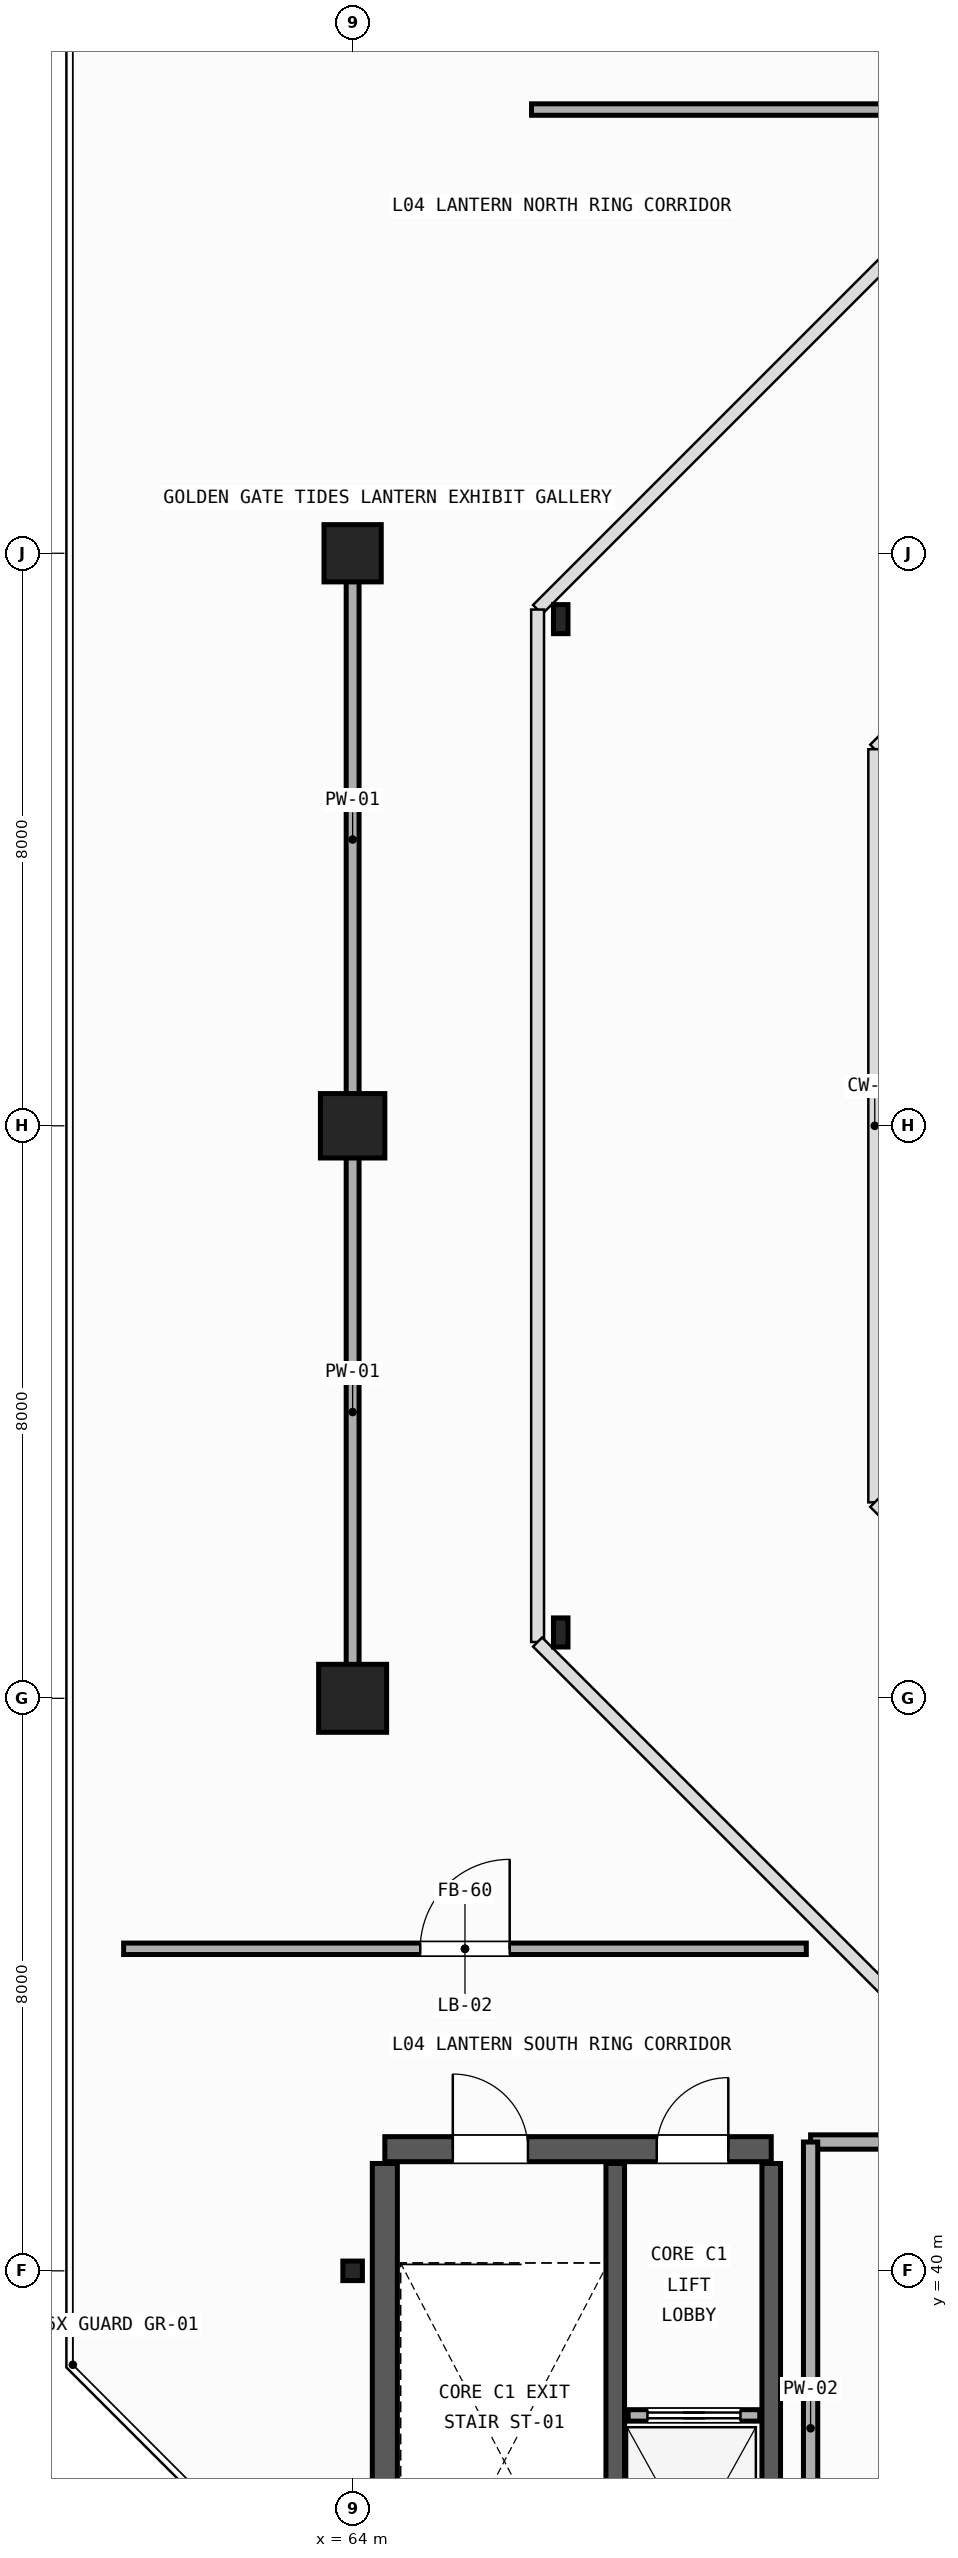
"""IFC4 building model, lengths in metres.
Left out: names, types, materials, properties, quantities, classifications, styles, units other than length and angle.
Written with IfcOpenShell. Run it as: python <this file> out.ifc"""

import sys

from ifc_helpers import new_model, si_unit, direction, frame, frame_2d, origin, origin_2d, place, context, subcontext, project, spatial, rectangle, hollow_rectangle, hollow_circle, extrude, element, fill, save


model = new_model("IFC4")
c1 = context("Model", 3, precision=1e-05, world=origin(), true_north=direction((0.0, 1.0)))
c2 = subcontext(c1, "Body", "Model", "MODEL_VIEW")
j1 = project(units=[si_unit("LENGTHUNIT", "METRE"), si_unit("PLANEANGLEUNIT", "RADIAN")], contexts=[c1])
p1 = place(None, origin())
s1 = spatial("IfcSite", under=j1, at=p1, CompositionType="ELEMENT")
p2 = place(p1, origin())
s2 = spatial("IfcBuilding", under=s1, at=p2, CompositionType="ELEMENT")
p3 = place(p2, frame((0.0, 0.0, 19.8)))
s3 = spatial("IfcBuildingStorey", under=s2, at=p3, CompositionType="ELEMENT", Elevation=19.8)
p4 = place(p3, frame((64.0, 40.0, 0.0), z_axis=(0.0, 0.0, 1.0), x_axis=(1.0, 0.0, 0.0)))
e1 = element("IfcColumn", 1, at=p4, inside=s3, PredefinedType="COLUMN", context=c2, shape_type="SweptSolid", body=[
    extrude(hollow_circle(Radius=0.136, WallThickness=0.012, at=origin_2d()), origin(), (0.0, 0.0, 1.0), 5.637),
])
p5 = place(p3, frame((64.0, 48.0, 0.0), z_axis=(0.0, 0.0, 1.0), x_axis=(0.0, 1.0, 0.0)))
e2 = element("IfcColumn", 2, at=p5, inside=s3, PredefinedType="COLUMN", context=c2, shape_type="SweptSolid", body=[
    extrude(rectangle(XDim=0.95, YDim=0.95, at=origin_2d()), origin(), (0.0, 0.0, 1.0), 5.245),
])
p6 = place(p3, frame((64.0, 56.0, 0.0), z_axis=(0.0, 0.0, 1.0), x_axis=(1.0, 0.0, 0.0)))
e3 = element("IfcColumn", 3, at=p6, inside=s3, PredefinedType="COLUMN", context=c2, shape_type="SweptSolid", body=[
    extrude(rectangle(XDim=0.9, YDim=0.9, at=origin_2d()), origin(), (0.0, 0.0, 1.0), 5.245),
])
p7 = place(p3, frame((64.0, 64.0, 0.0), z_axis=(0.0, 0.0, 1.0), x_axis=(0.0, 1.0, 0.0)))
e4 = element("IfcColumn", 4, at=p7, inside=s3, PredefinedType="COLUMN", context=c2, shape_type="SweptSolid", body=[
    extrude(rectangle(XDim=0.8, YDim=0.8, at=origin_2d()), origin(), (0.0, 0.0, 1.0), 5.245),
])
for number, where, z_axis, x_axis in (
    (5, (66.908, 63.08, 0.0), (0.0, 0.0, 1.0), (1.0, 0.0, 0.0)),
    (6, (66.908, 48.92, 0.0), (0.0, 0.0, 1.0), (1.0, 0.0, 0.0)),
):
    element("IfcColumn", number, at=place(p3, frame(where, z_axis=z_axis, x_axis=x_axis)), inside=s3, PredefinedType="COLUMN", context=c2, shape_type="SweptSolid", body=[
        extrude(hollow_rectangle(XDim=0.203, YDim=0.406, WallThickness=0.012, InnerFilletRadius=0.012, OuterFilletRadius=0.024, at=origin_2d()), origin(), (0.0, 0.0, 1.0), 5.72),
    ])
for number, where, z_axis, x_axis in (
    (7, (64.0, 48.2, 4.45), (0.0, 0.0, 1.0), (0.0, 1.0, 0.0)),
    (8, (64.0, 56.2, 4.45), (0.0, 0.0, 1.0), (0.0, 1.0, 0.0)),
):
    element("IfcWall", number, at=place(p3, frame(where, z_axis=z_axis, x_axis=x_axis)), inside=s3, PredefinedType="PARAPET", context=c2, shape_type="SweptSolid", body=[
        extrude(rectangle(XDim=7.6, YDim=0.18, at=frame_2d((3.8, 0.0))), origin(), (0.0, 0.0, 1.0), 1.25),
    ])
p8 = place(p3, frame((64.45, 41.7, 0.0), z_axis=(0.0, 0.0, 1.0), x_axis=(1.0, 0.0, 0.0)))
e9 = element("IfcWall", 9, at=p8, inside=s3, PredefinedType="SHEAR", context=c2, shape_type="SweptSolid", body=[
    extrude(rectangle(XDim=5.4, YDim=0.35, at=frame_2d((2.7, 0.0))), origin(), (0.0, 0.0, 1.0), 4.3),
])
p9 = place(p8, frame((0.95, 0.0, 0.0)))
e10 = element("IfcOpeningElement", 10, at=p9, cuts=e9, PredefinedType="OPENING", context=c2, shape_type="SweptSolid", body=[
    extrude(rectangle(XDim=1.05, YDim=2.1, at=frame_2d((0.525, 1.05))), frame((0.0, 0.185, 0.0), z_axis=(0.0, -1.0, 0.0), x_axis=(1.0, 0.0, 0.0)), (0.0, 0.0, 1.0), 0.37),
])
p10 = place(p8, frame((3.8, 0.0, 0.0)))
e11 = element("IfcOpeningElement", 11, at=p10, cuts=e9, PredefinedType="OPENING", context=c2, shape_type="SweptSolid", body=[
    extrude(rectangle(XDim=1.0, YDim=2.15, at=frame_2d((0.5, 1.075))), frame((0.0, 0.185, 0.0), z_axis=(0.0, -1.0, 0.0), x_axis=(1.0, 0.0, 0.0)), (0.0, 0.0, 1.0), 0.37),
])
p11 = place(p3, frame((64.45, 34.55, 0.0), z_axis=(0.0, 0.0, 1.0), x_axis=(0.0, 1.0, 0.0)))
e12 = element("IfcWall", 12, at=p11, inside=s3, PredefinedType="SHEAR", context=c2, shape_type="SweptSolid", body=[
    extrude(rectangle(XDim=6.95, YDim=0.35, at=frame_2d((3.475, 0.0))), origin(), (0.0, 0.0, 1.0), 4.3),
])
for number, where, z_axis, x_axis in (
    (13, (69.85, 34.55, 0.0), (0.0, 0.0, 1.0), (0.0, 1.0, 0.0)),
    (14, (67.67, 34.55, 0.0), (0.0, 0.0, 1.0), (0.0, 1.0, 0.0)),
):
    element("IfcWall", number, at=place(p3, frame(where, z_axis=z_axis, x_axis=x_axis)), inside=s3, PredefinedType="SHEAR", context=c2, shape_type="SweptSolid", body=[
        extrude(rectangle(XDim=6.95, YDim=0.26, at=frame_2d((3.475, 0.0))), origin(), (0.0, 0.0, 1.0), 4.3),
    ])
p12 = place(p3, frame((67.85, 37.98, 0.0), z_axis=(0.0, 0.0, 1.0), x_axis=(1.0, 0.0, 0.0)))
e15 = element("IfcWall", 15, at=p12, inside=s3, PredefinedType="PARTITIONING", context=c2, shape_type="SweptSolid", body=[
    extrude(rectangle(XDim=1.84, YDim=0.16, at=frame_2d((0.92, 0.0))), origin(), (0.0, 0.0, 1.0), 3.6),
])
p13 = place(p12, frame((0.27, 0.0, 0.0)))
e16 = element("IfcOpeningElement", 16, at=p13, cuts=e15, PredefinedType="OPENING", context=c2, shape_type="SweptSolid", body=[
    extrude(rectangle(XDim=1.3, YDim=2.2, at=frame_2d((0.65, 1.1))), frame((0.0, 0.09, 0.0), z_axis=(0.0, -1.0, 0.0), x_axis=(1.0, 0.0, 0.0)), (0.0, 0.0, 1.0), 0.18),
])
p14 = place(p3, frame((70.4, 41.8, 0.0), z_axis=(0.0, 0.0, 1.0), x_axis=(1.0, 0.0, 0.0)))
e17 = element("IfcWall", 17, at=p14, inside=s3, PredefinedType="PLUMBINGWALL", context=c2, shape_type="SweptSolid", body=[
    extrude(rectangle(XDim=5.4, YDim=0.2, at=frame_2d((2.7, 0.0))), origin(), (0.0, 0.0, 1.0), 4.157),
])
p15 = place(p14, frame((2.245, 0.0, 0.0)))
e18 = element("IfcOpeningElement", 18, at=p15, cuts=e17, PredefinedType="OPENING", context=c2, shape_type="SweptSolid", body=[
    extrude(rectangle(XDim=0.91, YDim=2.1, at=frame_2d((0.455, 1.05))), frame((0.0, 0.11, 0.0), z_axis=(0.0, -1.0, 0.0), x_axis=(1.0, 0.0, 0.0)), (0.0, 0.0, 1.0), 0.22),
])
p16 = place(p3, frame((70.4, 33.8, 0.0), z_axis=(0.0, 0.0, 1.0), x_axis=(0.0, 1.0, 0.0)))
e19 = element("IfcWall", 19, at=p16, inside=s3, PredefinedType="PLUMBINGWALL", context=c2, shape_type="SweptSolid", body=[
    extrude(rectangle(XDim=8.0, YDim=0.2, at=frame_2d((4.0, 0.0))), origin(), (0.0, 0.0, 1.0), 4.157),
])
p17 = place(p3, frame((60.8, 44.5, 0.0), z_axis=(0.0, 0.0, 1.0), x_axis=(1.0, 0.0, 0.0)))
e20 = element("IfcWall", 20, at=p17, inside=s3, PredefinedType="PARTITIONING", context=c2, shape_type="SweptSolid", body=[
    extrude(rectangle(XDim=9.54, YDim=0.16, at=frame_2d((4.77, 0.0))), origin(), (0.0, 0.0, 1.0), 4.157),
])
p18 = place(p17, frame((4.145, 0.0, 0.0)))
e21 = element("IfcOpeningElement", 21, at=p18, cuts=e20, PredefinedType="OPENING", context=c2, shape_type="SweptSolid", body=[
    extrude(rectangle(XDim=1.25, YDim=2.2, at=frame_2d((0.625, 1.1))), frame((0.0, 0.09, 0.0), z_axis=(0.0, -1.0, 0.0), x_axis=(1.0, 0.0, 0.0)), (0.0, 0.0, 1.0), 0.18),
])
p19 = place(p3, frame((66.5, 70.2, 0.0), z_axis=(0.0, 0.0, 1.0), x_axis=(1.0, 0.0, 0.0)))
e22 = element("IfcWall", 22, at=p19, inside=s3, PredefinedType="PARTITIONING", context=c2, shape_type="SweptSolid", body=[
    extrude(rectangle(XDim=29.3, YDim=0.16, at=frame_2d((14.65, 0.0))), origin(), (0.0, 0.0, 1.0), 4.157),
])
p20 = place(p19, frame((14.14, 0.0, 0.0)))
e23 = element("IfcOpeningElement", 23, at=p20, cuts=e22, PredefinedType="OPENING", context=c2, shape_type="SweptSolid", body=[
    extrude(rectangle(XDim=1.02, YDim=2.15, at=frame_2d((0.51, 1.075))), frame((0.0, 0.09, 0.0), z_axis=(0.0, -1.0, 0.0), x_axis=(1.0, 0.0, 0.0)), (0.0, 0.0, 1.0), 0.18),
])
p21 = place(p13, origin())
e24 = element("IfcDoor", 24, at=p21, inside=s3, OperationType="SLIDING_TO_LEFT", PredefinedType="DOOR", context=c2, shape_type="SweptSolid", body=[
    extrude(rectangle(XDim=1.3, YDim=2.2, at=frame_2d((0.65, 1.1))), frame((0.0, 0.025, 0.0), z_axis=(0.0, -1.0, 0.0), x_axis=(1.0, 0.0, 0.0)), (0.0, 0.0, 1.0), 0.05),
])
fill(e16, e24)
p22 = place(p9, origin())
e25 = element("IfcDoor", 25, at=p22, inside=s3, OperationType="SINGLE_SWING_LEFT", PredefinedType="DOOR", context=c2, shape_type="SweptSolid", body=[
    extrude(rectangle(XDim=1.05, YDim=2.1, at=frame_2d((0.525, 1.05))), frame((0.0, 0.025, 0.0), z_axis=(0.0, -1.0, 0.0), x_axis=(1.0, 0.0, 0.0)), (0.0, 0.0, 1.0), 0.05),
])
fill(e10, e25)
p23 = place(p10, origin())
e26 = element("IfcDoor", 26, at=p23, inside=s3, OperationType="SINGLE_SWING_RIGHT", PredefinedType="DOOR", context=c2, shape_type="SweptSolid", body=[
    extrude(rectangle(XDim=1.0, YDim=2.15, at=frame_2d((0.5, 1.075))), frame((0.0, 0.025, 0.0), z_axis=(0.0, -1.0, 0.0), x_axis=(1.0, 0.0, 0.0)), (0.0, 0.0, 1.0), 0.05),
])
fill(e11, e26)
p24 = place(p18, origin())
e27 = element("IfcDoor", 27, at=p24, inside=s3, OperationType="SINGLE_SWING_RIGHT", PredefinedType="DOOR", context=c2, shape_type="SweptSolid", body=[
    extrude(rectangle(XDim=1.25, YDim=2.2, at=frame_2d((0.625, 1.1))), frame((0.0, 0.025, 0.0), z_axis=(0.0, -1.0, 0.0), x_axis=(1.0, 0.0, 0.0)), (0.0, 0.0, 1.0), 0.05),
])
fill(e21, e27)
save(model, sys.argv[1])
